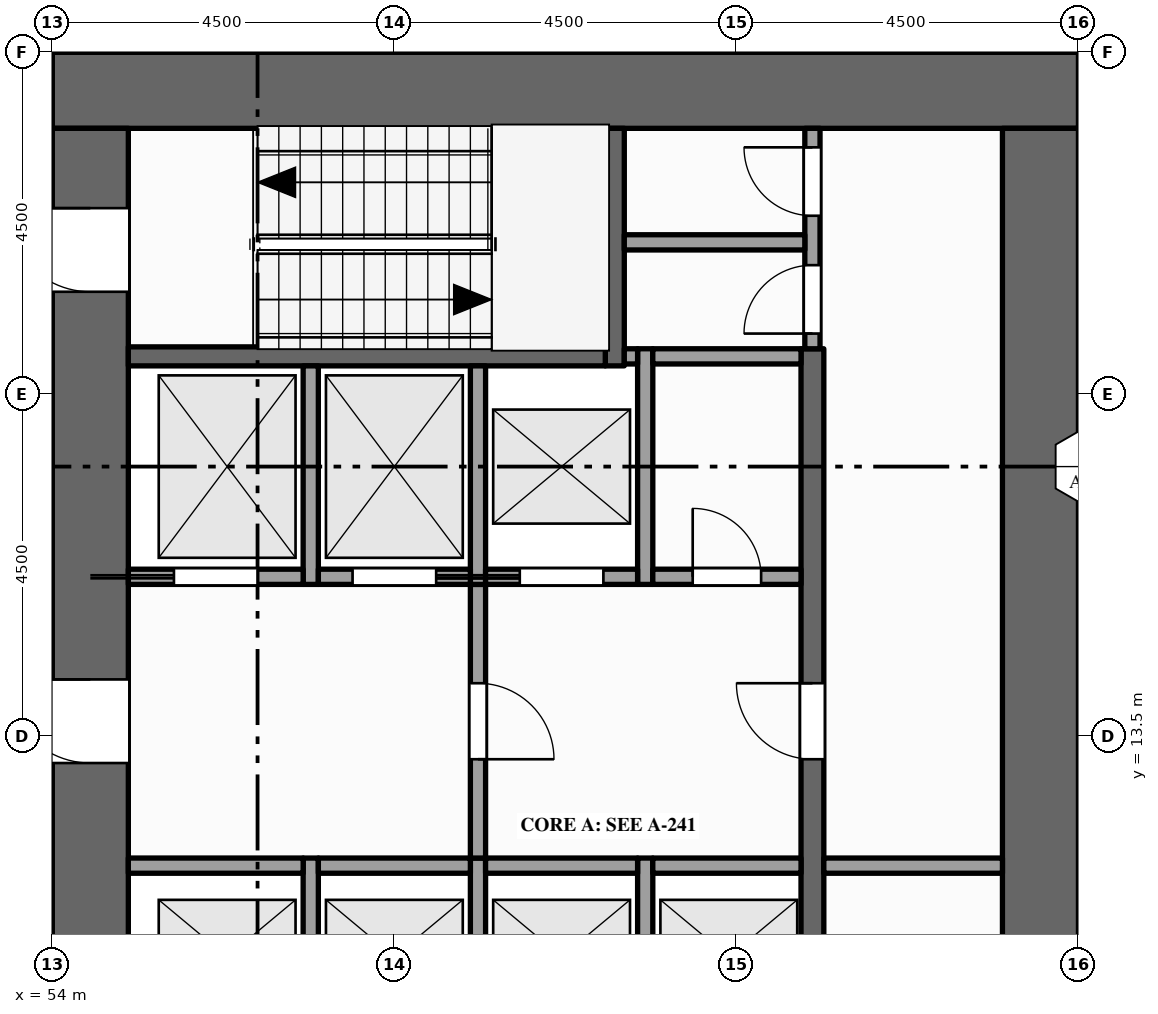
"""IFC4 building model, lengths in metres.
Left out: names, types, materials, properties, quantities, classifications, styles, units other than length and angle.
Written with IfcOpenShell. Run it as: python <this file> out.ifc"""

import sys

from ifc_helpers import new_model, si_unit, direction, frame, frame_2d, origin, place, context, subcontext, project, spatial, rectangle, extrude, element, fill, save


model = new_model("IFC4")
c1 = context("Model", 3, precision=1e-05, world=origin(), true_north=direction((0.0, 1.0)))
c2 = subcontext(c1, "Body", "Model", "MODEL_VIEW")
j1 = project(units=[si_unit("LENGTHUNIT", "METRE"), si_unit("PLANEANGLEUNIT", "RADIAN")], contexts=[c1])
p1 = place(None, origin())
s1 = spatial("IfcSite", under=j1, at=p1, CompositionType="ELEMENT")
p2 = place(p1, origin())
s2 = spatial("IfcBuilding", under=s1, at=p2, CompositionType="ELEMENT")
p3 = place(p2, frame((0.0, 0.0, 227.0)))
s3 = spatial("IfcBuildingStorey", under=s2, at=p3, CompositionType="ELEMENT", Elevation=227.0)
p4 = place(p3, frame((54.0, 22.0, -0.15), z_axis=(0.0, 0.0, 1.0), x_axis=(1.0, 0.0, 0.0)))
e1 = element("IfcWall", 1, at=p4, inside=s3, PredefinedType="SHEAR", context=c2, shape_type="SweptSolid", body=[
    extrude(rectangle(XDim=13.5, YDim=1.0, at=frame_2d((6.75, 0.0))), origin(), (0.0, 0.0, 1.0), 4.0),
])
p5 = place(p3, frame((54.5, 1.0, -0.15), z_axis=(0.0, 0.0, 1.0), x_axis=(0.0, 1.0, 0.0)))
e2 = element("IfcWall", 2, at=p5, inside=s3, PredefinedType="SHEAR", context=c2, shape_type="SweptSolid", body=[
    extrude(rectangle(XDim=20.5, YDim=1.0, at=frame_2d((10.25, 0.0))), origin(), (0.0, 0.0, 1.0), 4.0),
])
p6 = place(p5, frame((6.1, 0.0, 0.15)))
e3 = element("IfcOpeningElement", 3, at=p6, cuts=e2, PredefinedType="OPENING", context=c2, shape_type="SweptSolid", body=[
    extrude(rectangle(XDim=1.8, YDim=2.1, at=frame_2d((0.9, 1.05))), frame((0.0, 0.51, 0.0), z_axis=(0.0, -1.0, 0.0), x_axis=(1.0, 0.0, 0.0)), (0.0, 0.0, 1.0), 1.02),
])
p7 = place(p5, frame((12.15, 0.0, 0.15)))
e4 = element("IfcOpeningElement", 4, at=p7, cuts=e2, PredefinedType="OPENING", context=c2, shape_type="SweptSolid", body=[
    extrude(rectangle(XDim=1.1, YDim=2.1, at=frame_2d((0.55, 1.05))), frame((0.0, 0.51, 0.0), z_axis=(0.0, -1.0, 0.0), x_axis=(1.0, 0.0, 0.0)), (0.0, 0.0, 1.0), 1.02),
])
p8 = place(p5, frame((1.15, 0.0, 0.15)))
e5 = element("IfcOpeningElement", 5, at=p8, cuts=e2, PredefinedType="OPENING", context=c2, shape_type="SweptSolid", body=[
    extrude(rectangle(XDim=1.1, YDim=2.1, at=frame_2d((0.55, 1.05))), frame((0.0, 0.51, 0.0), z_axis=(0.0, -1.0, 0.0), x_axis=(1.0, 0.0, 0.0)), (0.0, 0.0, 1.0), 1.02),
])
p9 = place(p5, frame((18.35, 0.0, 0.15)))
e6 = element("IfcOpeningElement", 6, at=p9, cuts=e2, PredefinedType="OPENING", context=c2, shape_type="SweptSolid", body=[
    extrude(rectangle(XDim=1.1, YDim=2.1, at=frame_2d((0.55, 1.05))), frame((0.0, 0.51, 0.0), z_axis=(0.0, -1.0, 0.0), x_axis=(1.0, 0.0, 0.0)), (0.0, 0.0, 1.0), 1.02),
])
p10 = place(p3, frame((67.0, 1.0, -0.15), z_axis=(0.0, 0.0, 1.0), x_axis=(0.0, 1.0, 0.0)))
e7 = element("IfcWall", 7, at=p10, inside=s3, PredefinedType="SHEAR", context=c2, shape_type="SweptSolid", body=[
    extrude(rectangle(XDim=20.5, YDim=1.0, at=frame_2d((10.25, 0.0))), origin(), (0.0, 0.0, 1.0), 4.0),
])
p11 = place(p3, frame((57.4, 9.3, 0.0), z_axis=(0.0, 0.0, 1.0), x_axis=(0.0, 1.0, 0.0)))
e8 = element("IfcWall", 8, at=p11, inside=s3, PredefinedType="SOLIDWALL", context=c2, shape_type="SweptSolid", body=[
    extrude(rectangle(XDim=2.6, YDim=0.2, at=frame_2d((1.3, 0.0))), origin(), (0.0, 0.0, 1.0), 3.85),
])
p12 = place(p3, frame((57.4, 15.5, 0.0), z_axis=(0.0, 0.0, 1.0), x_axis=(0.0, 1.0, 0.0)))
e9 = element("IfcWall", 9, at=p12, inside=s3, PredefinedType="SOLIDWALL", context=c2, shape_type="SweptSolid", body=[
    extrude(rectangle(XDim=2.875, YDim=0.2, at=frame_2d((1.438, 0.0))), origin(), (0.0, 0.0, 1.0), 3.85),
])
p13 = place(p3, frame((59.6, 9.3, 0.0), z_axis=(0.0, 0.0, 1.0), x_axis=(0.0, 1.0, 0.0)))
e10 = element("IfcWall", 10, at=p13, inside=s3, PredefinedType="SOLIDWALL", context=c2, shape_type="SweptSolid", body=[
    extrude(rectangle(XDim=2.6, YDim=0.2, at=frame_2d((1.3, 0.0))), origin(), (0.0, 0.0, 1.0), 3.85),
])
p14 = place(p3, frame((59.6, 11.9, 0.0), z_axis=(0.0, 0.0, 1.0), x_axis=(0.0, 1.0, 0.0)))
e11 = element("IfcWall", 11, at=p14, inside=s3, PredefinedType="PARTITIONING", context=c2, shape_type="SweptSolid", body=[
    extrude(rectangle(XDim=3.6, YDim=0.2, at=frame_2d((1.8, 0.0))), origin(), (0.0, 0.0, 1.0), 3.85),
])
p15 = place(p14, frame((1.3, 0.0, 0.0)))
e12 = element("IfcOpeningElement", 12, at=p15, cuts=e11, PredefinedType="OPENING", context=c2, shape_type="SweptSolid", body=[
    extrude(rectangle(XDim=1.0, YDim=2.1, at=frame_2d((0.5, 1.05))), frame((0.0, 0.11, 0.0), z_axis=(0.0, -1.0, 0.0), x_axis=(1.0, 0.0, 0.0)), (0.0, 0.0, 1.0), 0.22),
])
p16 = place(p3, frame((59.6, 15.5, 0.0), z_axis=(0.0, 0.0, 1.0), x_axis=(0.0, 1.0, 0.0)))
e13 = element("IfcWall", 13, at=p16, inside=s3, PredefinedType="SOLIDWALL", context=c2, shape_type="SweptSolid", body=[
    extrude(rectangle(XDim=2.875, YDim=0.2, at=frame_2d((1.438, 0.0))), origin(), (0.0, 0.0, 1.0), 3.85),
])
p17 = place(p3, frame((61.4, 18.375, 0.0), z_axis=(0.0, 0.0, 1.0), x_axis=(0.0, 1.0, 0.0)))
e14 = element("IfcWall", 14, at=p17, inside=s3, PredefinedType="SHEAR", context=c2, shape_type="SweptSolid", body=[
    extrude(rectangle(XDim=3.125, YDim=0.25, at=frame_2d((1.562, 0.0))), origin(), (0.0, 0.0, 1.0), 3.85),
])
p18 = place(p3, frame((61.8, 9.3, 0.0), z_axis=(0.0, 0.0, 1.0), x_axis=(0.0, 1.0, 0.0)))
e15 = element("IfcWall", 15, at=p18, inside=s3, PredefinedType="SOLIDWALL", context=c2, shape_type="SweptSolid", body=[
    extrude(rectangle(XDim=2.6, YDim=0.2, at=frame_2d((1.3, 0.0))), origin(), (0.0, 0.0, 1.0), 3.85),
])
p19 = place(p3, frame((61.8, 15.5, 0.0), z_axis=(0.0, 0.0, 1.0), x_axis=(0.0, 1.0, 0.0)))
e16 = element("IfcWall", 16, at=p19, inside=s3, PredefinedType="SOLIDWALL", context=c2, shape_type="SweptSolid", body=[
    extrude(rectangle(XDim=3.1, YDim=0.2, at=frame_2d((1.55, 0.0))), origin(), (0.0, 0.0, 1.0), 3.85),
])
p20 = place(p3, frame((64.0, 4.1, 0.0), z_axis=(0.0, 0.0, 1.0), x_axis=(0.0, 1.0, 0.0)))
e17 = element("IfcWall", 17, at=p20, inside=s3, PredefinedType="SHEAR", context=c2, shape_type="SweptSolid", body=[
    extrude(rectangle(XDim=14.5, YDim=0.3, at=frame_2d((7.25, 0.0))), origin(), (0.0, 0.0, 1.0), 3.85),
])
p21 = place(p20, frame((3.4, 0.0, 0.0)))
e18 = element("IfcOpeningElement", 18, at=p21, cuts=e17, PredefinedType="OPENING", context=c2, shape_type="SweptSolid", body=[
    extrude(rectangle(XDim=1.0, YDim=2.1, at=frame_2d((0.5, 1.05))), frame((0.0, 0.16, 0.0), z_axis=(0.0, -1.0, 0.0), x_axis=(1.0, 0.0, 0.0)), (0.0, 0.0, 1.0), 0.32),
])
p22 = place(p20, frame((9.1, 0.0, 0.0)))
e19 = element("IfcOpeningElement", 19, at=p22, cuts=e17, PredefinedType="OPENING", context=c2, shape_type="SweptSolid", body=[
    extrude(rectangle(XDim=1.0, YDim=2.1, at=frame_2d((0.5, 1.05))), frame((0.0, 0.16, 0.0), z_axis=(0.0, -1.0, 0.0), x_axis=(1.0, 0.0, 0.0)), (0.0, 0.0, 1.0), 0.32),
])
p23 = place(p3, frame((64.0, 18.6, 0.0), z_axis=(0.0, 0.0, 1.0), x_axis=(0.0, 1.0, 0.0)))
e20 = element("IfcWall", 20, at=p23, inside=s3, PredefinedType="PARTITIONING", context=c2, shape_type="SweptSolid", body=[
    extrude(rectangle(XDim=2.9, YDim=0.2, at=frame_2d((1.45, 0.0))), origin(), (0.0, 0.0, 1.0), 3.85),
])
p24 = place(p23, frame((0.2, 0.0, 0.0)))
e21 = element("IfcOpeningElement", 21, at=p24, cuts=e20, PredefinedType="OPENING", context=c2, shape_type="SweptSolid", body=[
    extrude(rectangle(XDim=0.9, YDim=2.1, at=frame_2d((0.45, 1.05))), frame((0.0, 0.11, 0.0), z_axis=(0.0, -1.0, 0.0), x_axis=(1.0, 0.0, 0.0)), (0.0, 0.0, 1.0), 0.22),
])
p25 = place(p23, frame((1.75, 0.0, 0.0)))
e22 = element("IfcOpeningElement", 22, at=p25, cuts=e20, PredefinedType="OPENING", context=c2, shape_type="SweptSolid", body=[
    extrude(rectangle(XDim=0.9, YDim=2.1, at=frame_2d((0.45, 1.05))), frame((0.0, 0.11, 0.0), z_axis=(0.0, -1.0, 0.0), x_axis=(1.0, 0.0, 0.0)), (0.0, 0.0, 1.0), 0.22),
])
p26 = place(p3, frame((55.0, 11.8, 0.0), z_axis=(0.0, 0.0, 1.0), x_axis=(1.0, 0.0, 0.0)))
e23 = element("IfcWall", 23, at=p26, inside=s3, PredefinedType="SOLIDWALL", context=c2, shape_type="SweptSolid", body=[
    extrude(rectangle(XDim=2.3, YDim=0.2, at=frame_2d((1.15, 0.0))), origin(), (0.0, 0.0, 1.0), 3.85),
])
for number, where, z_axis, x_axis in (
    (24, (57.5, 11.8, 0.0), (0.0, 0.0, 1.0), (1.0, 0.0, 0.0)),
    (25, (59.7, 11.8, 0.0), (0.0, 0.0, 1.0), (1.0, 0.0, 0.0)),
):
    element("IfcWall", number, at=place(p3, frame(where, z_axis=z_axis, x_axis=x_axis)), inside=s3, PredefinedType="SOLIDWALL", context=c2, shape_type="SweptSolid", body=[
        extrude(rectangle(XDim=2.0, YDim=0.2, at=frame_2d((1.0, 0.0))), origin(), (0.0, 0.0, 1.0), 3.85),
    ])
p27 = place(p3, frame((61.9, 11.8, 0.0), z_axis=(0.0, 0.0, 1.0), x_axis=(1.0, 0.0, 0.0)))
e26 = element("IfcWall", 26, at=p27, inside=s3, PredefinedType="SOLIDWALL", context=c2, shape_type="SweptSolid", body=[
    extrude(rectangle(XDim=1.95, YDim=0.2, at=frame_2d((0.975, 0.0))), origin(), (0.0, 0.0, 1.0), 3.85),
])
p28 = place(p3, frame((64.15, 11.8, 0.0), z_axis=(0.0, 0.0, 1.0), x_axis=(1.0, 0.0, 0.0)))
e27 = element("IfcWall", 27, at=p28, inside=s3, PredefinedType="PARTITIONING", context=c2, shape_type="SweptSolid", body=[
    extrude(rectangle(XDim=2.35, YDim=0.2, at=frame_2d((1.175, 0.0))), origin(), (0.0, 0.0, 1.0), 3.85),
])
p29 = place(p3, frame((55.0, 15.6, 0.0), z_axis=(0.0, 0.0, 1.0), x_axis=(1.0, 0.0, 0.0)))
e28 = element("IfcWall", 28, at=p29, inside=s3, PredefinedType="SOLIDWALL", context=c2, shape_type="SweptSolid", body=[
    extrude(rectangle(XDim=2.3, YDim=0.2, at=frame_2d((1.15, 0.0))), origin(), (0.0, 0.0, 1.0), 3.85),
])
p30 = place(p29, frame((0.6, 0.0, 0.012)))
e29 = element("IfcOpeningElement", 29, at=p30, cuts=e28, PredefinedType="OPENING", context=c2, shape_type="SweptSolid", body=[
    extrude(rectangle(XDim=1.1, YDim=2.1, at=frame_2d((0.55, 1.05))), frame((0.0, 0.11, 0.0), z_axis=(0.0, -1.0, 0.0), x_axis=(1.0, 0.0, 0.0)), (0.0, 0.0, 1.0), 0.22),
])
p31 = place(p3, frame((57.5, 15.6, 0.0), z_axis=(0.0, 0.0, 1.0), x_axis=(1.0, 0.0, 0.0)))
e30 = element("IfcWall", 30, at=p31, inside=s3, PredefinedType="SOLIDWALL", context=c2, shape_type="SweptSolid", body=[
    extrude(rectangle(XDim=2.0, YDim=0.2, at=frame_2d((1.0, 0.0))), origin(), (0.0, 0.0, 1.0), 3.85),
])
p32 = place(p31, frame((0.45, 0.0, 0.012)))
e31 = element("IfcOpeningElement", 31, at=p32, cuts=e30, PredefinedType="OPENING", context=c2, shape_type="SweptSolid", body=[
    extrude(rectangle(XDim=1.1, YDim=2.1, at=frame_2d((0.55, 1.05))), frame((0.0, 0.11, 0.0), z_axis=(0.0, -1.0, 0.0), x_axis=(1.0, 0.0, 0.0)), (0.0, 0.0, 1.0), 0.22),
])
p33 = place(p3, frame((59.7, 15.6, 0.0), z_axis=(0.0, 0.0, 1.0), x_axis=(1.0, 0.0, 0.0)))
e32 = element("IfcWall", 32, at=p33, inside=s3, PredefinedType="SOLIDWALL", context=c2, shape_type="SweptSolid", body=[
    extrude(rectangle(XDim=2.0, YDim=0.2, at=frame_2d((1.0, 0.0))), origin(), (0.0, 0.0, 1.0), 3.85),
])
p34 = place(p33, frame((0.45, 0.0, 0.012)))
e33 = element("IfcOpeningElement", 33, at=p34, cuts=e32, PredefinedType="OPENING", context=c2, shape_type="SweptSolid", body=[
    extrude(rectangle(XDim=1.1, YDim=2.1, at=frame_2d((0.55, 1.05))), frame((0.0, 0.11, 0.0), z_axis=(0.0, -1.0, 0.0), x_axis=(1.0, 0.0, 0.0)), (0.0, 0.0, 1.0), 0.22),
])
p35 = place(p3, frame((61.9, 15.6, 0.0), z_axis=(0.0, 0.0, 1.0), x_axis=(1.0, 0.0, 0.0)))
e34 = element("IfcWall", 34, at=p35, inside=s3, PredefinedType="PARTITIONING", context=c2, shape_type="SweptSolid", body=[
    extrude(rectangle(XDim=1.95, YDim=0.2, at=frame_2d((0.975, 0.0))), origin(), (0.0, 0.0, 1.0), 3.85),
])
p36 = place(p35, frame((0.525, 0.0, 0.0)))
e35 = element("IfcOpeningElement", 35, at=p36, cuts=e34, PredefinedType="OPENING", context=c2, shape_type="SweptSolid", body=[
    extrude(rectangle(XDim=0.9, YDim=2.1, at=frame_2d((0.45, 1.05))), frame((0.0, 0.11, 0.0), z_axis=(0.0, -1.0, 0.0), x_axis=(1.0, 0.0, 0.0)), (0.0, 0.0, 1.0), 0.22),
])
p37 = place(p3, frame((55.0, 18.5, 0.0), z_axis=(0.0, 0.0, 1.0), x_axis=(1.0, 0.0, 0.0)))
e36 = element("IfcWall", 36, at=p37, inside=s3, PredefinedType="SHEAR", context=c2, shape_type="SweptSolid", body=[
    extrude(rectangle(XDim=6.275, YDim=0.25, at=frame_2d((3.137, 0.0))), origin(), (0.0, 0.0, 1.0), 3.85),
])
p38 = place(p3, frame((61.525, 18.5, 0.0), z_axis=(0.0, 0.0, 1.0), x_axis=(1.0, 0.0, 0.0)))
e37 = element("IfcWall", 37, at=p38, inside=s3, PredefinedType="SOLIDWALL", context=c2, shape_type="SweptSolid", body=[
    extrude(rectangle(XDim=0.175, YDim=0.2, at=frame_2d((0.087, 0.0))), origin(), (0.0, 0.0, 1.0), 3.85),
])
p39 = place(p3, frame((61.9, 18.5, 0.0), z_axis=(0.0, 0.0, 1.0), x_axis=(1.0, 0.0, 0.0)))
e38 = element("IfcWall", 38, at=p39, inside=s3, PredefinedType="PARTITIONING", context=c2, shape_type="SweptSolid", body=[
    extrude(rectangle(XDim=1.95, YDim=0.2, at=frame_2d((0.975, 0.0))), origin(), (0.0, 0.0, 1.0), 3.85),
])
p40 = place(p3, frame((61.525, 20.0, 0.0), z_axis=(0.0, 0.0, 1.0), x_axis=(1.0, 0.0, 0.0)))
e39 = element("IfcWall", 39, at=p40, inside=s3, PredefinedType="PARTITIONING", context=c2, shape_type="SweptSolid", body=[
    extrude(rectangle(XDim=2.375, YDim=0.2, at=frame_2d((1.188, 0.0))), origin(), (0.0, 0.0, 1.0), 3.85),
])
p41 = place(p30, origin())
e40 = element("IfcDoor", 40, at=p41, inside=s3, OperationType="SLIDING_TO_LEFT", PredefinedType="DOOR", context=c2, shape_type="SweptSolid", body=[
    extrude(rectangle(XDim=1.1, YDim=2.1, at=frame_2d((0.55, 1.05))), frame((0.0, 0.025, 0.0), z_axis=(0.0, -1.0, 0.0), x_axis=(1.0, 0.0, 0.0)), (0.0, 0.0, 1.0), 0.05),
])
fill(e29, e40)
p42 = place(p32, origin())
e41 = element("IfcDoor", 41, at=p42, inside=s3, OperationType="SLIDING_TO_RIGHT", PredefinedType="DOOR", context=c2, shape_type="SweptSolid", body=[
    extrude(rectangle(XDim=1.1, YDim=2.1, at=frame_2d((0.55, 1.05))), frame((0.0, 0.025, 0.0), z_axis=(0.0, -1.0, 0.0), x_axis=(1.0, 0.0, 0.0)), (0.0, 0.0, 1.0), 0.05),
])
fill(e31, e41)
p43 = place(p34, origin())
e42 = element("IfcDoor", 42, at=p43, inside=s3, OperationType="SLIDING_TO_LEFT", PredefinedType="DOOR", context=c2, shape_type="SweptSolid", body=[
    extrude(rectangle(XDim=1.1, YDim=2.1, at=frame_2d((0.55, 1.05))), frame((0.0, 0.025, 0.0), z_axis=(0.0, -1.0, 0.0), x_axis=(1.0, 0.0, 0.0)), (0.0, 0.0, 1.0), 0.05),
])
fill(e33, e42)
p44 = place(p7, origin())
e43 = element("IfcDoor", 43, at=p44, inside=s3, OperationType="SINGLE_SWING_RIGHT", PredefinedType="DOOR", context=c2, shape_type="SweptSolid", body=[
    extrude(rectangle(XDim=1.1, YDim=2.1, at=frame_2d((0.55, 1.05))), frame((0.0, 0.025, 0.0), z_axis=(0.0, -1.0, 0.0), x_axis=(1.0, 0.0, 0.0)), (0.0, 0.0, 1.0), 0.05),
])
fill(e4, e43)
p45 = place(p15, origin())
e44 = element("IfcDoor", 44, at=p45, inside=s3, OperationType="SINGLE_SWING_LEFT", PredefinedType="DOOR", context=c2, shape_type="SweptSolid", body=[
    extrude(rectangle(XDim=1.0, YDim=2.1, at=frame_2d((0.5, 1.05))), frame((0.0, 0.025, 0.0), z_axis=(0.0, -1.0, 0.0), x_axis=(1.0, 0.0, 0.0)), (0.0, 0.0, 1.0), 0.05),
])
fill(e12, e44)
p46 = place(p22, origin())
e45 = element("IfcDoor", 45, at=p46, inside=s3, OperationType="SINGLE_SWING_RIGHT", PredefinedType="DOOR", context=c2, shape_type="SweptSolid", body=[
    extrude(rectangle(XDim=1.0, YDim=2.1, at=frame_2d((0.5, 1.05))), frame((0.0, 0.025, 0.0), z_axis=(0.0, -1.0, 0.0), x_axis=(1.0, 0.0, 0.0)), (0.0, 0.0, 1.0), 0.05),
])
fill(e19, e45)
p47 = place(p9, origin())
e46 = element("IfcDoor", 46, at=p47, inside=s3, OperationType="SINGLE_SWING_RIGHT", PredefinedType="DOOR", context=c2, shape_type="SweptSolid", body=[
    extrude(rectangle(XDim=1.1, YDim=2.1, at=frame_2d((0.55, 1.05))), frame((0.0, 0.025, 0.0), z_axis=(0.0, -1.0, 0.0), x_axis=(1.0, 0.0, 0.0)), (0.0, 0.0, 1.0), 0.05),
])
fill(e6, e46)
p48 = place(p24, origin())
e47 = element("IfcDoor", 47, at=p48, inside=s3, OperationType="SINGLE_SWING_LEFT", PredefinedType="DOOR", context=c2, shape_type="SweptSolid", body=[
    extrude(rectangle(XDim=0.9, YDim=2.1, at=frame_2d((0.45, 1.05))), frame((0.0, 0.025, 0.0), z_axis=(0.0, -1.0, 0.0), x_axis=(1.0, 0.0, 0.0)), (0.0, 0.0, 1.0), 0.05),
])
fill(e21, e47)
p49 = place(p25, origin())
e48 = element("IfcDoor", 48, at=p49, inside=s3, OperationType="SINGLE_SWING_RIGHT", PredefinedType="DOOR", context=c2, shape_type="SweptSolid", body=[
    extrude(rectangle(XDim=0.9, YDim=2.1, at=frame_2d((0.45, 1.05))), frame((0.0, 0.025, 0.0), z_axis=(0.0, -1.0, 0.0), x_axis=(1.0, 0.0, 0.0)), (0.0, 0.0, 1.0), 0.05),
])
fill(e22, e48)
p50 = place(p36, origin())
e49 = element("IfcDoor", 49, at=p50, inside=s3, OperationType="SINGLE_SWING_LEFT", PredefinedType="DOOR", context=c2, shape_type="SweptSolid", body=[
    extrude(rectangle(XDim=0.9, YDim=2.1, at=frame_2d((0.45, 1.05))), frame((0.0, 0.025, 0.0), z_axis=(0.0, -1.0, 0.0), x_axis=(1.0, 0.0, 0.0)), (0.0, 0.0, 1.0), 0.05),
])
fill(e35, e49)
save(model, sys.argv[1])
